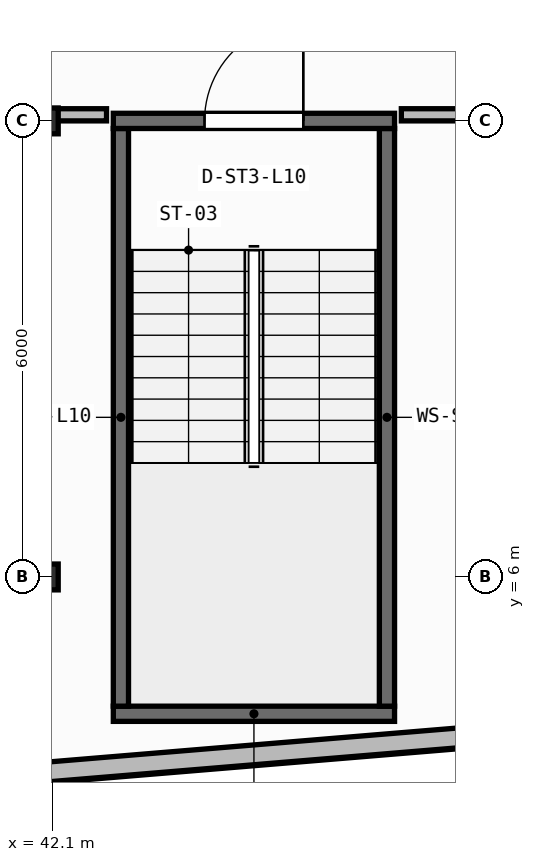
"""IFC4 building model, lengths in metres.
Left out: names, types, materials, properties, quantities, classifications, styles, units other than length and angle.
Written with IfcOpenShell. Run it as: python <this file> out.ifc"""

import sys

from ifc_helpers import new_model, si_unit, direction, frame, frame_2d, origin, origin_2d, place, context, subcontext, project, spatial, rectangle, i_section, extrude, element, fill, save


model = new_model("IFC4")
c1 = context("Model", 3, precision=1e-05, world=origin(), true_north=direction((0.0, 1.0)))
c2 = subcontext(c1, "Body", "Model", "MODEL_VIEW")
j1 = project(units=[si_unit("LENGTHUNIT", "METRE"), si_unit("PLANEANGLEUNIT", "RADIAN")], contexts=[c1])
p1 = place(None, origin())
s1 = spatial("IfcSite", under=j1, at=p1, CompositionType="ELEMENT")
p2 = place(p1, origin())
s2 = spatial("IfcBuilding", under=s1, at=p2, CompositionType="ELEMENT")
p3 = place(p2, frame((0.0, 0.0, 42.25)))
s3 = spatial("IfcBuildingStorey", under=s2, at=p3, CompositionType="ELEMENT", Elevation=42.25)
for number, where, z_axis, x_axis in (
    (1, (42.0, 6.0, 0.0), (0.0, 0.0, 1.0), (1.0, 0.0, 0.0)),
    (2, (42.0, 12.0, 0.0), (0.0, 0.0, 1.0), (1.0, 0.0, 0.0)),
):
    element("IfcColumn", number, at=place(p3, frame(where, z_axis=z_axis, x_axis=x_axis)), inside=s3, PredefinedType="COLUMN", context=c2, shape_type="SweptSolid", body=[
        extrude(i_section(OverallWidth=0.35, OverallDepth=0.34, WebThickness=0.016, FlangeThickness=0.028, at=origin_2d()), origin(), (0.0, 0.0, 1.0), 3.95),
    ])
p4 = place(p3, frame((2.76, 0.174, 0.0), z_axis=(0.0, 0.0, 1.0), x_axis=(0.996571478456, 0.082736257641, 0.0)))
e3 = element("IfcWall", 3, at=p4, inside=s3, PredefinedType="STANDARD", context=c2, shape_type="SweptSolid", body=[
    extrude(rectangle(XDim=52.861, YDim=0.26, at=frame_2d((26.431, 0.0))), origin(), (0.0, 0.0, 1.0), 3.71),
])
p5 = place(p4, frame((25.231, 0.0, 0.9)))
e4 = element("IfcOpeningElement", 4, at=p5, cuts=e3, PredefinedType="OPENING", context=c2, shape_type="SweptSolid", body=[
    extrude(rectangle(XDim=2.4, YDim=1.65, at=frame_2d((1.2, 0.825))), frame((0.0, 0.14, 0.0), z_axis=(0.0, -1.0, 0.0), x_axis=(1.0, 0.0, 0.0)), (0.0, 0.0, 1.0), 0.28),
])
p6 = place(p3, frame((42.9, 4.2, 0.0), z_axis=(0.0, 0.0, 1.0), x_axis=(1.0, 0.0, 0.0)))
e5 = element("IfcWall", 5, at=p6, inside=s3, PredefinedType="SHEAR", context=c2, shape_type="SweptSolid", body=[
    extrude(rectangle(XDim=3.7, YDim=0.2, at=frame_2d((1.85, 0.0))), origin(), (0.0, 0.0, 1.0), 3.71),
])
for number, where, z_axis, x_axis in (
    (6, (43.0, 4.3, 0.0), (0.0, 0.0, 1.0), (0.0, 1.0, 0.0)),
    (7, (46.5, 4.3, 0.0), (0.0, 0.0, 1.0), (0.0, 1.0, 0.0)),
):
    element("IfcWall", number, at=place(p3, frame(where, z_axis=z_axis, x_axis=x_axis)), inside=s3, PredefinedType="SHEAR", context=c2, shape_type="SweptSolid", body=[
        extrude(rectangle(XDim=7.6, YDim=0.2, at=frame_2d((3.8, 0.0))), origin(), (0.0, 0.0, 1.0), 3.71),
    ])
p7 = place(p3, frame((42.9, 12.0, 0.0), z_axis=(0.0, 0.0, 1.0), x_axis=(1.0, 0.0, 0.0)))
e8 = element("IfcWall", 8, at=p7, inside=s3, PredefinedType="SHEAR", context=c2, shape_type="SweptSolid", body=[
    extrude(rectangle(XDim=3.7, YDim=0.2, at=frame_2d((1.85, 0.0))), origin(), (0.0, 0.0, 1.0), 3.71),
])
p8 = place(p7, frame((1.2, 0.0, 0.0)))
e9 = element("IfcOpeningElement", 9, at=p8, cuts=e8, PredefinedType="OPENING", context=c2, shape_type="SweptSolid", body=[
    extrude(rectangle(XDim=1.3, YDim=2.15, at=frame_2d((0.65, 1.075))), frame((0.0, 0.11, 0.0), z_axis=(0.0, -1.0, 0.0), x_axis=(1.0, 0.0, 0.0)), (0.0, 0.0, 1.0), 0.22),
])
p9 = place(p3, frame((31.63, 12.08, 0.0), z_axis=(0.0, 0.0, 1.0), x_axis=(1.0, 0.0, 0.0)))
e10 = element("IfcWall", 10, at=p9, inside=s3, PredefinedType="PARTITIONING", context=c2, shape_type="SweptSolid", body=[
    extrude(rectangle(XDim=11.181, YDim=0.16, at=frame_2d((5.59, 0.0))), origin(), (0.0, 0.0, 1.0), 3.073),
])
p10 = place(p3, frame((46.689, 12.08, 0.0), z_axis=(0.0, 0.0, 1.0), x_axis=(1.0, 0.0, 0.0)))
e11 = element("IfcWall", 11, at=p10, inside=s3, PredefinedType="PARTITIONING", context=c2, shape_type="SweptSolid", body=[
    extrude(rectangle(XDim=3.011, YDim=0.16, at=frame_2d((1.505, 0.0))), origin(), (0.0, 0.0, 1.0), 3.073),
])
p11 = place(p8, origin())
e12 = element("IfcDoor", 12, at=p11, inside=s3, OperationType="SINGLE_SWING_RIGHT", PredefinedType="DOOR", context=c2, shape_type="SweptSolid", body=[
    extrude(rectangle(XDim=1.3, YDim=2.15, at=frame_2d((0.65, 1.075))), frame((0.0, 0.025, 0.0), z_axis=(0.0, -1.0, 0.0), x_axis=(1.0, 0.0, 0.0)), (0.0, 0.0, 1.0), 0.05),
])
fill(e9, e12)
save(model, sys.argv[1])
